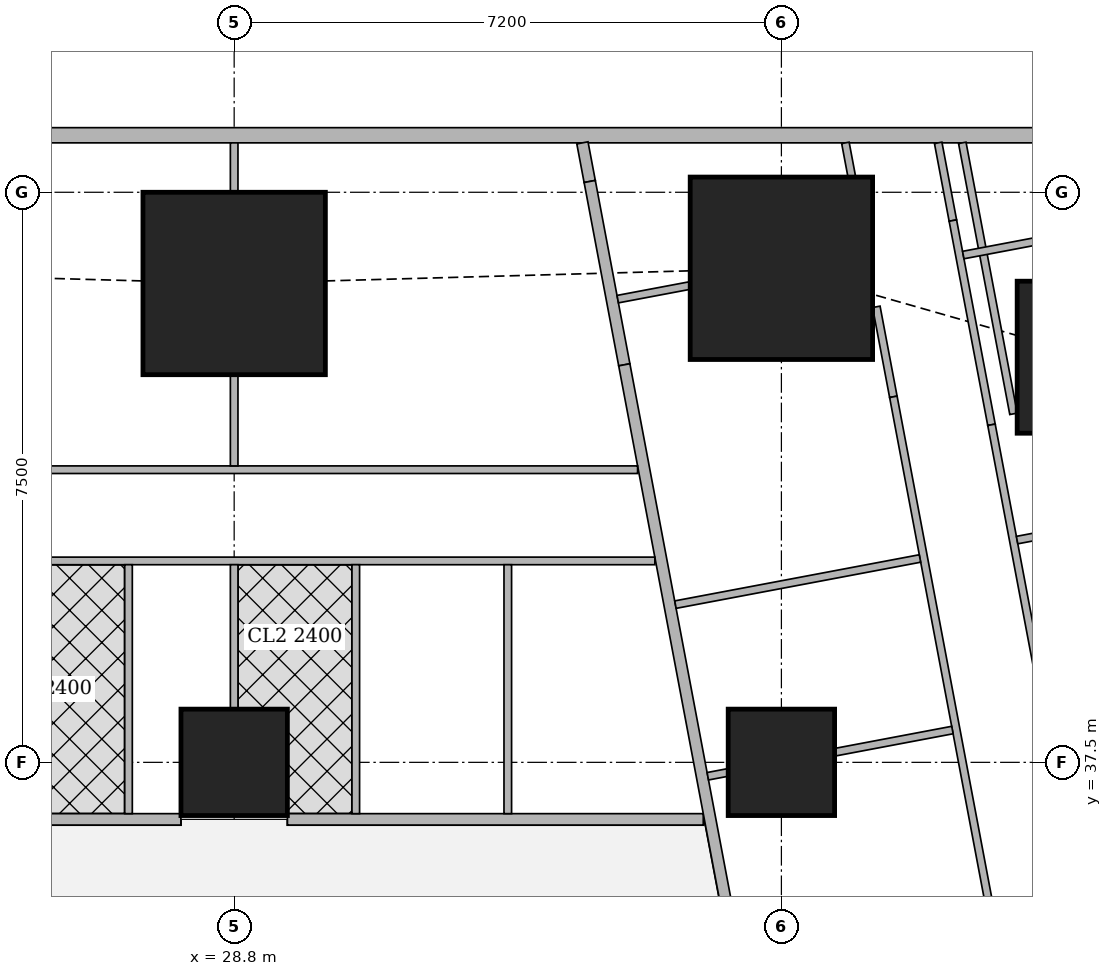
"""IFC4 building model, lengths in metres.
Left out: names, types, materials, properties, quantities, classifications, styles, units other than length and angle.
Written with IfcOpenShell. Run it as: python <this file> out.ifc"""

import sys

from ifc_helpers import new_model, si_unit, direction, frame, frame_2d, origin, origin_2d, place, context, subcontext, project, spatial, rectangle, extrude, element, fill, save


model = new_model("IFC4")
c1 = context("Model", 3, precision=1e-05, world=origin(), true_north=direction((0.0, 1.0)))
c2 = subcontext(c1, "Body", "Model", "MODEL_VIEW")
j1 = project(units=[si_unit("LENGTHUNIT", "METRE"), si_unit("PLANEANGLEUNIT", "RADIAN")], contexts=[c1])
p1 = place(None, origin())
s1 = spatial("IfcSite", under=j1, at=p1, CompositionType="ELEMENT")
p2 = place(p1, origin())
s2 = spatial("IfcBuilding", under=s1, at=p2, CompositionType="ELEMENT")
p3 = place(p2, frame((0.0, 0.0, 234.95)))
s3 = spatial("IfcBuildingStorey", under=s2, at=p3, CompositionType="ELEMENT", Elevation=234.95)
for number, where, z_axis, x_axis in (
    (1, (28.8, 37.5, 0.0), (0.0, 0.0, 1.0), (1.0, 0.0, 0.0)),
    (2, (36.0, 37.5, 0.0), (0.0, 0.0, 1.0), (1.0, 0.0, 0.0)),
):
    element("IfcColumn", number, at=place(p3, frame(where, z_axis=z_axis, x_axis=x_axis)), inside=s3, PredefinedType="COLUMN", context=c2, shape_type="SweptSolid", body=[
        extrude(rectangle(XDim=1.4, YDim=1.4, at=origin_2d()), origin(), (0.0, 0.0, 1.0), 3.75),
    ])
p4 = place(p3, frame((40.102, 42.83, 0.0), z_axis=(0.0, 0.0, 1.0), x_axis=(1.0, 0.0, 0.0)))
e3 = element("IfcColumn", 3, at=p4, inside=s3, PredefinedType="COLUMN", context=c2, shape_type="SweptSolid", body=[
    extrude(rectangle(XDim=2.0, YDim=2.0, at=origin_2d()), origin(), (0.0, 0.0, 1.0), 3.75),
])
for number, where, z_axis, x_axis in (
    (4, (28.8, 43.8, 0.0), (0.0, 0.0, 1.0), (1.0, 0.0, 0.0)),
    (5, (36.0, 44.0, 0.0), (0.0, 0.0, 1.0), (1.0, 0.0, 0.0)),
):
    element("IfcColumn", number, at=place(p3, frame(where, z_axis=z_axis, x_axis=x_axis)), inside=s3, PredefinedType="COLUMN", context=c2, shape_type="SweptSolid", body=[
        extrude(rectangle(XDim=2.4, YDim=2.4, at=origin_2d()), origin(), (0.0, 0.0, 1.0), 3.75),
    ])
p5 = place(p3, frame((40.106, 45.75, 0.0), z_axis=(0.0, 0.0, 1.0), x_axis=(-1.0, 0.0, 0.0)))
e6 = element("IfcWall", 6, at=p5, inside=s3, PredefinedType="SOLIDWALL", context=c2, shape_type="SweptSolid", body=[
    extrude(rectangle(XDim=25.543, YDim=0.2, at=frame_2d((12.771, 0.0))), origin(), (0.0, 0.0, 1.0), 3.5),
])
p6 = place(p5, frame((8.606, 0.0, 0.9)))
e7 = element("IfcOpeningElement", 7, at=p6, cuts=e6, PredefinedType="OPENING", context=c2, shape_type="SweptSolid", body=[
    extrude(rectangle(XDim=1.8, YDim=1.5, at=frame_2d((0.9, 0.75))), frame((0.0, 0.11, 0.0), z_axis=(0.0, -1.0, 0.0), x_axis=(1.0, 0.0, 0.0)), (0.0, 0.0, 1.0), 0.22),
])
p7 = place(p5, frame((12.206, 0.0, 0.9)))
e8 = element("IfcOpeningElement", 8, at=p7, cuts=e6, PredefinedType="OPENING", context=c2, shape_type="SweptSolid", body=[
    extrude(rectangle(XDim=1.8, YDim=1.5, at=frame_2d((0.9, 0.75))), frame((0.0, 0.11, 0.0), z_axis=(0.0, -1.0, 0.0), x_axis=(1.0, 0.0, 0.0)), (0.0, 0.0, 1.0), 0.22),
])
p8 = place(p5, frame((15.806, 0.0, 0.9)))
e9 = element("IfcOpeningElement", 9, at=p8, cuts=e6, PredefinedType="OPENING", context=c2, shape_type="SweptSolid", body=[
    extrude(rectangle(XDim=1.8, YDim=1.5, at=frame_2d((0.9, 0.75))), frame((0.0, 0.11, 0.0), z_axis=(0.0, -1.0, 0.0), x_axis=(1.0, 0.0, 0.0)), (0.0, 0.0, 1.0), 0.22),
])
p9 = place(p5, frame((20.825, 0.0, 0.9)))
e10 = element("IfcOpeningElement", 10, at=p9, cuts=e6, PredefinedType="OPENING", context=c2, shape_type="SweptSolid", body=[
    extrude(rectangle(XDim=2.4, YDim=1.5, at=frame_2d((1.2, 0.75))), frame((0.0, 0.11, 0.0), z_axis=(0.0, -1.0, 0.0), x_axis=(1.0, 0.0, 0.0)), (0.0, 0.0, 1.0), 0.22),
])
p10 = place(p3, frame((22.301, 36.75, 0.0), z_axis=(0.0, 0.0, 1.0), x_axis=(1.0, 0.0, 0.0)))
e11 = element("IfcWall", 11, at=p10, inside=s3, PredefinedType="SOLIDWALL", context=c2, shape_type="SweptSolid", body=[
    extrude(rectangle(XDim=5.798, YDim=0.15, at=frame_2d((2.899, 0.0))), origin(), (0.0, 0.0, 1.0), 3.5),
])
p11 = place(p10, frame((0.799, 0.0, 0.0)))
e12 = element("IfcOpeningElement", 12, at=p11, cuts=e11, PredefinedType="OPENING", context=c2, shape_type="SweptSolid", body=[
    extrude(rectangle(XDim=1.0, YDim=2.1, at=frame_2d((0.5, 1.05))), frame((0.0, 0.085, 0.0), z_axis=(0.0, -1.0, 0.0), x_axis=(1.0, 0.0, 0.0)), (0.0, 0.0, 1.0), 0.17),
])
p12 = place(p3, frame((29.501, 36.75, 0.0), z_axis=(0.0, 0.0, 1.0), x_axis=(1.0, 0.0, 0.0)))
e13 = element("IfcWall", 13, at=p12, inside=s3, PredefinedType="SOLIDWALL", context=c2, shape_type="SweptSolid", body=[
    extrude(rectangle(XDim=5.471, YDim=0.15, at=frame_2d((2.735, 0.0))), origin(), (0.0, 0.0, 1.0), 3.5),
])
p13 = place(p3, frame((33.382, 45.65, 0.0), z_axis=(0.0, 0.0, 1.0), x_axis=(0.185657456326, -0.982614527122, 0.0)))
e14 = element("IfcWall", 14, at=p13, inside=s3, PredefinedType="SOLIDWALL", context=c2, shape_type="SweptSolid", body=[
    extrude(rectangle(XDim=0.517, YDim=0.15, at=frame_2d((0.258, 0.0))), origin(), (0.0, 0.0, 1.0), 3.5),
])
p14 = place(p3, frame((33.478, 45.142, 0.0), z_axis=(0.0, 0.0, 1.0), x_axis=(0.185393362436, -0.982664388876, 0.0)))
e15 = element("IfcWall", 15, at=p14, inside=s3, PredefinedType="SOLIDWALL", context=c2, shape_type="SweptSolid", body=[
    extrude(rectangle(XDim=2.455, YDim=0.15, at=frame_2d((1.227, 0.0))), origin(), (0.0, 0.0, 1.0), 2.05),
])
p15 = place(p3, frame((33.933, 42.73, 0.0), z_axis=(0.0, 0.0, 1.0), x_axis=(0.185595417643, -0.982626246825, 0.0)))
e16 = element("IfcWall", 16, at=p15, inside=s3, PredefinedType="SOLIDWALL", context=c2, shape_type="SweptSolid", body=[
    extrude(rectangle(XDim=41.051, YDim=0.15, at=frame_2d((20.525, 0.0))), origin(), (0.0, 0.0, 1.0), 2.5),
])
p16 = place(p15, frame((12.266, 0.0, 0.0)))
e17 = element("IfcOpeningElement", 17, at=p16, cuts=e16, PredefinedType="OPENING", context=c2, shape_type="SweptSolid", body=[
    extrude(rectangle(XDim=1.0, YDim=2.1, at=frame_2d((0.5, 1.05))), frame((0.0, 0.085, 0.0), z_axis=(0.0, -1.0, 0.0), x_axis=(1.0, 0.0, 0.0)), (0.0, 0.0, 1.0), 0.17),
])
p17 = place(p15, frame((16.082, 0.0, 0.0)))
e18 = element("IfcOpeningElement", 18, at=p17, cuts=e16, PredefinedType="OPENING", context=c2, shape_type="SweptSolid", body=[
    extrude(rectangle(XDim=1.0, YDim=2.1, at=frame_2d((0.5, 1.05))), frame((0.0, 0.085, 0.0), z_axis=(0.0, -1.0, 0.0), x_axis=(1.0, 0.0, 0.0)), (0.0, 0.0, 1.0), 0.17),
])
p18 = place(p15, frame((30.862, 0.0, 0.0)))
e19 = element("IfcOpeningElement", 19, at=p18, cuts=e16, PredefinedType="OPENING", context=c2, shape_type="SweptSolid", body=[
    extrude(rectangle(XDim=1.0, YDim=2.1, at=frame_2d((0.5, 1.05))), frame((0.0, 0.085, 0.0), z_axis=(0.0, -1.0, 0.0), x_axis=(1.0, 0.0, 0.0)), (0.0, 0.0, 1.0), 0.17),
])
p19 = place(p3, frame((39.054, 42.085, 0.0), z_axis=(0.0, 0.0, 1.0), x_axis=(-0.185791584218, 0.982589175207, 0.0)))
e20 = element("IfcWall", 20, at=p19, inside=s3, PredefinedType="PARTITIONING", context=c2, shape_type="SweptSolid", body=[
    extrude(rectangle(XDim=3.628, YDim=0.1, at=frame_2d((1.814, 0.0))), origin(), (0.0, 0.0, 1.0), 2.05),
])
p20 = place(p3, frame((38.063, 45.65, 0.0), z_axis=(0.0, 0.0, 1.0), x_axis=(0.185677287841, -0.982610779902, 0.0)))
e21 = element("IfcWall", 21, at=p20, inside=s3, PredefinedType="PARTITIONING", context=c2, shape_type="SweptSolid", body=[
    extrude(rectangle(XDim=1.04, YDim=0.1, at=frame_2d((0.52, 0.0))), origin(), (0.0, 0.0, 1.0), 3.5),
])
p21 = place(p3, frame((38.256, 44.628, 0.0), z_axis=(0.0, 0.0, 1.0), x_axis=(0.185700639943, -0.982606366927, 0.0)))
e22 = element("IfcWall", 22, at=p21, inside=s3, PredefinedType="PARTITIONING", context=c2, shape_type="SweptSolid", body=[
    extrude(rectangle(XDim=2.735, YDim=0.1, at=frame_2d((1.367, 0.0))), origin(), (0.0, 0.0, 1.0), 2.05),
])
p22 = place(p3, frame((38.764, 41.941, 0.0), z_axis=(0.0, 0.0, 1.0), x_axis=(0.185548572312, -0.982635093671, 0.0)))
e23 = element("IfcWall", 23, at=p22, inside=s3, PredefinedType="PARTITIONING", context=c2, shape_type="SweptSolid", body=[
    extrude(rectangle(XDim=9.135, YDim=0.1, at=frame_2d((4.568, 0.0))), origin(), (0.0, 0.0, 1.0), 3.5),
])
p23 = place(p22, frame((8.085, 0.0, 0.0)))
e24 = element("IfcOpeningElement", 24, at=p23, cuts=e23, PredefinedType="OPENING", context=c2, shape_type="SweptSolid", body=[
    extrude(rectangle(XDim=0.9, YDim=2.1, at=frame_2d((0.45, 1.05))), frame((0.0, 0.06, 0.0), z_axis=(0.0, -1.0, 0.0), x_axis=(1.0, 0.0, 0.0)), (0.0, 0.0, 1.0), 0.12),
])
p24 = place(p22, frame((3.7, 0.0, 0.0)))
e25 = element("IfcOpeningElement", 25, at=p24, cuts=e23, PredefinedType="OPENING", context=c2, shape_type="SweptSolid", body=[
    extrude(rectangle(XDim=0.9, YDim=2.1, at=frame_2d((0.45, 1.05))), frame((0.0, 0.06, 0.0), z_axis=(0.0, -1.0, 0.0), x_axis=(1.0, 0.0, 0.0)), (0.0, 0.0, 1.0), 0.12),
])
p25 = place(p3, frame((36.842, 45.65, 0.0), z_axis=(0.0, 0.0, 1.0), x_axis=(0.185407859198, -0.982661653748, 0.0)))
e26 = element("IfcWall", 26, at=p25, inside=s3, PredefinedType="PARTITIONING", context=c2, shape_type="SweptSolid", body=[
    extrude(rectangle(XDim=0.448, YDim=0.1, at=frame_2d((0.224, 0.0))), origin(), (0.0, 0.0, 1.0), 3.5),
])
p26 = place(p3, frame((37.249, 43.493, 0.0), z_axis=(0.0, 0.0, 1.0), x_axis=(0.185817643817, -0.982584247404, 0.0)))
e27 = element("IfcWall", 27, at=p26, inside=s3, PredefinedType="PARTITIONING", context=c2, shape_type="SweptSolid", body=[
    extrude(rectangle(XDim=1.205, YDim=0.1, at=frame_2d((0.603, 0.0))), origin(), (0.0, 0.0, 1.0), 2.05),
])
p27 = place(p3, frame((37.473, 42.309, 0.0), z_axis=(0.0, 0.0, 1.0), x_axis=(0.185491912953, -0.982645790827, 0.0)))
e28 = element("IfcWall", 28, at=p27, inside=s3, PredefinedType="PARTITIONING", context=c2, shape_type="SweptSolid", body=[
    extrude(rectangle(XDim=9.737, YDim=0.1, at=frame_2d((4.869, 0.0))), origin(), (0.0, 0.0, 1.0), 3.5),
])
p28 = place(p27, frame((8.232, 0.0, 0.0)))
e29 = element("IfcOpeningElement", 29, at=p28, cuts=e28, PredefinedType="OPENING", context=c2, shape_type="SweptSolid", body=[
    extrude(rectangle(XDim=0.9, YDim=2.1, at=frame_2d((0.45, 1.05))), frame((0.0, 0.06, 0.0), z_axis=(0.0, -1.0, 0.0), x_axis=(1.0, 0.0, 0.0)), (0.0, 0.0, 1.0), 0.12),
])
p29 = place(p27, frame((2.853, 0.0, 0.0)))
e30 = element("IfcOpeningElement", 30, at=p29, cuts=e28, PredefinedType="OPENING", context=c2, shape_type="SweptSolid", body=[
    extrude(rectangle(XDim=0.9, YDim=2.1, at=frame_2d((0.45, 1.05))), frame((0.0, 0.06, 0.0), z_axis=(0.0, -1.0, 0.0), x_axis=(1.0, 0.0, 0.0)), (0.0, 0.0, 1.0), 0.12),
])
p30 = place(p27, frame((5.564, 0.0, 0.0)))
e31 = element("IfcOpeningElement", 31, at=p30, cuts=e28, PredefinedType="OPENING", context=c2, shape_type="SweptSolid", body=[
    extrude(rectangle(XDim=0.9, YDim=2.1, at=frame_2d((0.45, 1.05))), frame((0.0, 0.06, 0.0), z_axis=(0.0, -1.0, 0.0), x_axis=(1.0, 0.0, 0.0)), (0.0, 0.0, 1.0), 0.12),
])
p31 = place(p3, frame((41.968, 44.85, 0.0), z_axis=(0.0, 0.0, 1.0), x_axis=(-0.98258614234, -0.185807623311, 0.0)))
e32 = element("IfcWall", 32, at=p31, inside=s3, PredefinedType="PARTITIONING", context=c2, shape_type="SweptSolid", body=[
    extrude(rectangle(XDim=3.638, YDim=0.1, at=frame_2d((1.819, 0.0))), origin(), (0.0, 0.0, 1.0), 2.05),
])
p32 = place(p3, frame((43.277, 41.212, 0.0), z_axis=(0.0, 0.0, 1.0), x_axis=(-0.982665405803, -0.185387972203, 0.0)))
e33 = element("IfcWall", 33, at=p32, inside=s3, PredefinedType="PARTITIONING", context=c2, shape_type="SweptSolid", body=[
    extrude(rectangle(XDim=4.25, YDim=0.1, at=frame_2d((2.125, 0.0))), origin(), (0.0, 0.0, 1.0), 2.05),
])
p33 = place(p3, frame((34.79, 43.772, 0.0), z_axis=(0.0, 0.0, 1.0), x_axis=(-0.982655532093, -0.185440301034, 0.0)))
e34 = element("IfcWall", 34, at=p33, inside=s3, PredefinedType="PARTITIONING", context=c2, shape_type="SweptSolid", body=[
    extrude(rectangle(XDim=0.96, YDim=0.1, at=frame_2d((0.48, 0.0))), origin(), (0.0, 0.0, 1.0), 2.05),
])
p34 = place(p3, frame((37.823, 40.182, 0.0), z_axis=(0.0, 0.0, 1.0), x_axis=(-0.982664729897, -0.18539155487, 0.0)))
e35 = element("IfcWall", 35, at=p34, inside=s3, PredefinedType="PARTITIONING", context=c2, shape_type="SweptSolid", body=[
    extrude(rectangle(XDim=3.274, YDim=0.1, at=frame_2d((1.637, 0.0))), origin(), (0.0, 0.0, 1.0), 3.5),
])
p35 = place(p3, frame((38.25, 37.925, 0.0), z_axis=(0.0, 0.0, 1.0), x_axis=(-0.982610209589, -0.185680305934, 0.0)))
e36 = element("IfcWall", 36, at=p35, inside=s3, PredefinedType="PARTITIONING", context=c2, shape_type="SweptSolid", body=[
    extrude(rectangle(XDim=1.567, YDim=0.1, at=frame_2d((0.784, 0.0))), origin(), (0.0, 0.0, 1.0), 3.5),
])
p36 = place(p3, frame((35.29, 37.366, 0.0), z_axis=(0.0, 0.0, 1.0), x_axis=(-0.982395465615, -0.18681313963, 0.0)))
e37 = element("IfcWall", 37, at=p36, inside=s3, PredefinedType="PARTITIONING", context=c2, shape_type="SweptSolid", body=[
    extrude(rectangle(XDim=0.263, YDim=0.1, at=frame_2d((0.131, 0.0))), origin(), (0.0, 0.0, 1.0), 3.5),
])
p37 = place(p3, frame((25.2, 41.35, 0.0), z_axis=(0.0, 0.0, 1.0), x_axis=(1.0, 0.0, 0.0)))
e38 = element("IfcWall", 38, at=p37, inside=s3, PredefinedType="PARTITIONING", context=c2, shape_type="SweptSolid", body=[
    extrude(rectangle(XDim=8.908, YDim=0.1, at=frame_2d((4.454, 0.0))), origin(), (0.0, 0.0, 1.0), 3.5),
])
p38 = place(p37, frame((0.2, 0.0, 0.0)))
e39 = element("IfcOpeningElement", 39, at=p38, cuts=e38, PredefinedType="OPENING", context=c2, shape_type="SweptSolid", body=[
    extrude(rectangle(XDim=0.9, YDim=2.1, at=frame_2d((0.45, 1.05))), frame((0.0, 0.06, 0.0), z_axis=(0.0, -1.0, 0.0), x_axis=(1.0, 0.0, 0.0)), (0.0, 0.0, 1.0), 0.12),
])
p39 = place(p37, frame((4.85, 0.0, 0.0)))
e40 = element("IfcOpeningElement", 40, at=p39, cuts=e38, PredefinedType="OPENING", context=c2, shape_type="SweptSolid", body=[
    extrude(rectangle(XDim=0.9, YDim=2.1, at=frame_2d((0.45, 1.05))), frame((0.0, 0.06, 0.0), z_axis=(0.0, -1.0, 0.0), x_axis=(1.0, 0.0, 0.0)), (0.0, 0.0, 1.0), 0.12),
])
p40 = place(p3, frame((25.2, 40.15, 0.0), z_axis=(0.0, 0.0, 1.0), x_axis=(1.0, 0.0, 0.0)))
e41 = element("IfcWall", 41, at=p40, inside=s3, PredefinedType="PARTITIONING", context=c2, shape_type="SweptSolid", body=[
    extrude(rectangle(XDim=9.135, YDim=0.1, at=frame_2d((4.567, 0.0))), origin(), (0.0, 0.0, 1.0), 3.5),
])
p41 = place(p40, frame((0.655, 0.0, 0.0)))
e42 = element("IfcOpeningElement", 42, at=p41, cuts=e41, PredefinedType="OPENING", context=c2, shape_type="SweptSolid", body=[
    extrude(rectangle(XDim=0.9, YDim=2.1, at=frame_2d((0.45, 1.05))), frame((0.0, 0.06, 0.0), z_axis=(0.0, -1.0, 0.0), x_axis=(1.0, 0.0, 0.0)), (0.0, 0.0, 1.0), 0.12),
])
p42 = place(p40, frame((3.95, 0.0, 0.0)))
e43 = element("IfcOpeningElement", 43, at=p42, cuts=e41, PredefinedType="OPENING", context=c2, shape_type="SweptSolid", body=[
    extrude(rectangle(XDim=0.9, YDim=2.1, at=frame_2d((0.45, 1.05))), frame((0.0, 0.06, 0.0), z_axis=(0.0, -1.0, 0.0), x_axis=(1.0, 0.0, 0.0)), (0.0, 0.0, 1.0), 0.12),
])
p43 = place(p40, frame((8.081, 0.0, 0.0)))
e44 = element("IfcOpeningElement", 44, at=p43, cuts=e41, PredefinedType="OPENING", context=c2, shape_type="SweptSolid", body=[
    extrude(rectangle(XDim=0.9, YDim=2.1, at=frame_2d((0.45, 1.05))), frame((0.0, 0.06, 0.0), z_axis=(0.0, -1.0, 0.0), x_axis=(1.0, 0.0, 0.0)), (0.0, 0.0, 1.0), 0.12),
])
p44 = place(p40, frame((2.455, 0.0, 0.0)))
e45 = element("IfcOpeningElement", 45, at=p44, cuts=e41, PredefinedType="OPENING", context=c2, shape_type="SweptSolid", body=[
    extrude(rectangle(XDim=0.9, YDim=2.1, at=frame_2d((0.45, 1.05))), frame((0.0, 0.06, 0.0), z_axis=(0.0, -1.0, 0.0), x_axis=(1.0, 0.0, 0.0)), (0.0, 0.0, 1.0), 0.12),
])
p45 = place(p40, frame((5.75, 0.0, 0.0)))
e46 = element("IfcOpeningElement", 46, at=p45, cuts=e41, PredefinedType="OPENING", context=c2, shape_type="SweptSolid", body=[
    extrude(rectangle(XDim=0.9, YDim=2.1, at=frame_2d((0.45, 1.05))), frame((0.0, 0.06, 0.0), z_axis=(0.0, -1.0, 0.0), x_axis=(1.0, 0.0, 0.0)), (0.0, 0.0, 1.0), 0.12),
])
p46 = place(p3, frame((28.8, 41.4, 0.0), z_axis=(0.0, 0.0, 1.0), x_axis=(0.0, 1.0, 0.0)))
e47 = element("IfcWall", 47, at=p46, inside=s3, PredefinedType="PARTITIONING", context=c2, shape_type="SweptSolid", body=[
    extrude(rectangle(XDim=1.199, YDim=0.1, at=frame_2d((0.6, 0.0))), origin(), (0.0, 0.0, 1.0), 3.5),
])
p47 = place(p3, frame((28.8, 45.001, 0.0), z_axis=(0.0, 0.0, 1.0), x_axis=(0.0, 1.0, 0.0)))
e48 = element("IfcWall", 48, at=p47, inside=s3, PredefinedType="PARTITIONING", context=c2, shape_type="SweptSolid", body=[
    extrude(rectangle(XDim=0.649, YDim=0.1, at=frame_2d((0.324, 0.0))), origin(), (0.0, 0.0, 1.0), 3.5),
])
p48 = place(p3, frame((28.8, 38.201, 0.0), z_axis=(0.0, 0.0, 1.0), x_axis=(0.0, 1.0, 0.0)))
e49 = element("IfcWall", 49, at=p48, inside=s3, PredefinedType="PARTITIONING", context=c2, shape_type="SweptSolid", body=[
    extrude(rectangle(XDim=1.899, YDim=0.1, at=frame_2d((0.95, 0.0))), origin(), (0.0, 0.0, 1.0), 3.5),
])
for number, where, z_axis, x_axis in (
    (50, (32.4, 36.825, 0.0), (0.0, 0.0, 1.0), (0.0, 1.0, 0.0)),
    (51, (27.41, 36.825, 0.0), (0.0, 0.0, 1.0), (0.0, 1.0, 0.0)),
    (52, (30.4, 36.825, 0.0), (0.0, 0.0, 1.0), (0.0, 1.0, 0.0)),
):
    element("IfcWall", number, at=place(p3, frame(where, z_axis=z_axis, x_axis=x_axis)), inside=s3, PredefinedType="PARTITIONING", context=c2, shape_type="SweptSolid", body=[
        extrude(rectangle(XDim=3.275, YDim=0.1, at=frame_2d((1.638, 0.0))), origin(), (0.0, 0.0, 1.0), 3.5),
    ])
p49 = place(p6, origin())
e53 = element("IfcWindow", 53, at=p49, inside=s3, PartitioningType="SINGLE_PANEL", PredefinedType="WINDOW", context=c2, shape_type="SweptSolid", body=[
    extrude(rectangle(XDim=1.8, YDim=1.5, at=frame_2d((0.9, 0.75))), frame((0.0, 0.03, 0.0), z_axis=(0.0, -1.0, 0.0), x_axis=(1.0, 0.0, 0.0)), (0.0, 0.0, 1.0), 0.06),
])
fill(e7, e53)
p50 = place(p7, origin())
e54 = element("IfcWindow", 54, at=p50, inside=s3, PartitioningType="SINGLE_PANEL", PredefinedType="WINDOW", context=c2, shape_type="SweptSolid", body=[
    extrude(rectangle(XDim=1.8, YDim=1.5, at=frame_2d((0.9, 0.75))), frame((0.0, 0.03, 0.0), z_axis=(0.0, -1.0, 0.0), x_axis=(1.0, 0.0, 0.0)), (0.0, 0.0, 1.0), 0.06),
])
fill(e8, e54)
p51 = place(p29, origin())
e55 = element("IfcDoor", 55, at=p51, inside=s3, OperationType="SINGLE_SWING_RIGHT", PredefinedType="DOOR", context=c2, shape_type="SweptSolid", body=[
    extrude(rectangle(XDim=0.9, YDim=2.1, at=frame_2d((0.45, 1.05))), frame((0.0, 0.025, 0.0), z_axis=(0.0, -1.0, 0.0), x_axis=(1.0, 0.0, 0.0)), (0.0, 0.0, 1.0), 0.05),
])
fill(e30, e55)
p52 = place(p30, origin())
e56 = element("IfcDoor", 56, at=p52, inside=s3, OperationType="SINGLE_SWING_RIGHT", PredefinedType="DOOR", context=c2, shape_type="SweptSolid", body=[
    extrude(rectangle(XDim=0.9, YDim=2.1, at=frame_2d((0.45, 1.05))), frame((0.0, 0.025, 0.0), z_axis=(0.0, -1.0, 0.0), x_axis=(1.0, 0.0, 0.0)), (0.0, 0.0, 1.0), 0.05),
])
fill(e31, e56)
p53 = place(p39, origin())
e57 = element("IfcDoor", 57, at=p53, inside=s3, OperationType="SINGLE_SWING_LEFT", PredefinedType="DOOR", context=c2, shape_type="SweptSolid", body=[
    extrude(rectangle(XDim=0.9, YDim=2.1, at=frame_2d((0.45, 1.05))), frame((0.0, 0.025, 0.0), z_axis=(0.0, -1.0, 0.0), x_axis=(1.0, 0.0, 0.0)), (0.0, 0.0, 1.0), 0.05),
])
fill(e40, e57)
p54 = place(p41, origin())
e58 = element("IfcDoor", 58, at=p54, inside=s3, OperationType="SINGLE_SWING_RIGHT", PredefinedType="DOOR", context=c2, shape_type="SweptSolid", body=[
    extrude(rectangle(XDim=0.9, YDim=2.1, at=frame_2d((0.45, 1.05))), frame((0.0, 0.025, 0.0), z_axis=(0.0, -1.0, 0.0), x_axis=(1.0, 0.0, 0.0)), (0.0, 0.0, 1.0), 0.05),
])
fill(e42, e58)
p55 = place(p42, origin())
e59 = element("IfcDoor", 59, at=p55, inside=s3, OperationType="SINGLE_SWING_RIGHT", PredefinedType="DOOR", context=c2, shape_type="SweptSolid", body=[
    extrude(rectangle(XDim=0.9, YDim=2.1, at=frame_2d((0.45, 1.05))), frame((0.0, 0.025, 0.0), z_axis=(0.0, -1.0, 0.0), x_axis=(1.0, 0.0, 0.0)), (0.0, 0.0, 1.0), 0.05),
])
fill(e43, e59)
p56 = place(p43, origin())
e60 = element("IfcDoor", 60, at=p56, inside=s3, OperationType="SINGLE_SWING_LEFT", PredefinedType="DOOR", context=c2, shape_type="SweptSolid", body=[
    extrude(rectangle(XDim=0.9, YDim=2.1, at=frame_2d((0.45, 1.05))), frame((0.0, 0.025, 0.0), z_axis=(0.0, -1.0, 0.0), x_axis=(1.0, 0.0, 0.0)), (0.0, 0.0, 1.0), 0.05),
])
fill(e44, e60)
p57 = place(p44, origin())
e61 = element("IfcDoor", 61, at=p57, inside=s3, OperationType="SINGLE_SWING_LEFT", PredefinedType="DOOR", context=c2, shape_type="SweptSolid", body=[
    extrude(rectangle(XDim=0.9, YDim=2.1, at=frame_2d((0.45, 1.05))), frame((0.0, 0.025, 0.0), z_axis=(0.0, -1.0, 0.0), x_axis=(1.0, 0.0, 0.0)), (0.0, 0.0, 1.0), 0.05),
])
fill(e45, e61)
p58 = place(p45, origin())
e62 = element("IfcDoor", 62, at=p58, inside=s3, OperationType="SINGLE_SWING_LEFT", PredefinedType="DOOR", context=c2, shape_type="SweptSolid", body=[
    extrude(rectangle(XDim=0.9, YDim=2.1, at=frame_2d((0.45, 1.05))), frame((0.0, 0.025, 0.0), z_axis=(0.0, -1.0, 0.0), x_axis=(1.0, 0.0, 0.0)), (0.0, 0.0, 1.0), 0.05),
])
fill(e46, e62)
save(model, sys.argv[1])
